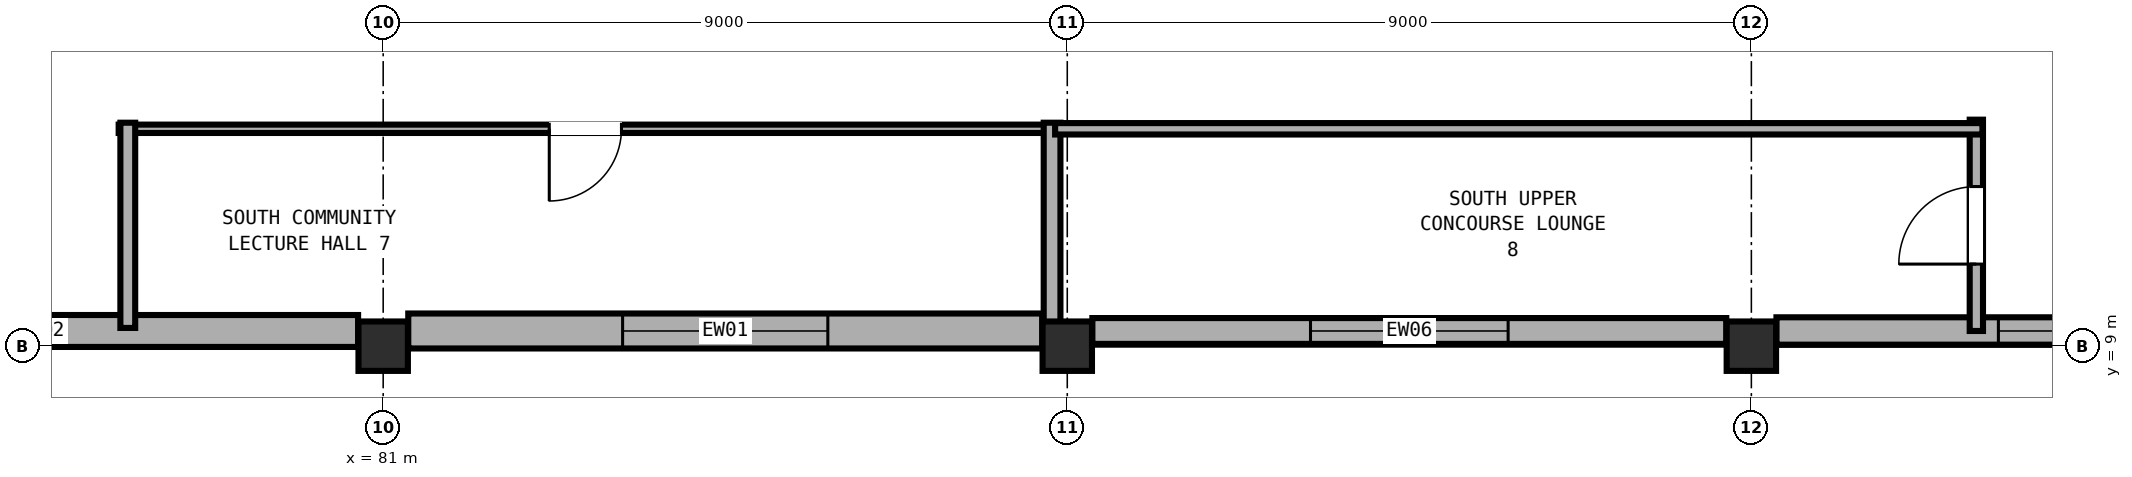
"""IFC4 building model, lengths in metres.
Left out: names, types, materials, properties, quantities, classifications, styles, units other than length and angle.
Written with IfcOpenShell. Run it as: python <this file> out.ifc"""

import sys

from ifc_helpers import new_model, si_unit, direction, frame, frame_2d, origin, origin_2d, place, context, subcontext, project, spatial, rectangle, extrude, element, fill, save


model = new_model("IFC4")
c1 = context("Model", 3, precision=1e-05, world=origin(), true_north=direction((0.0, 1.0)))
c2 = subcontext(c1, "Body", "Model", "MODEL_VIEW")
j1 = project(units=[si_unit("LENGTHUNIT", "METRE"), si_unit("PLANEANGLEUNIT", "RADIAN")], contexts=[c1])
p1 = place(None, origin())
s1 = spatial("IfcSite", under=j1, at=p1, CompositionType="ELEMENT")
p2 = place(p1, origin())
s2 = spatial("IfcBuilding", under=s1, at=p2, CompositionType="ELEMENT")
p3 = place(p2, frame((0.0, 0.0, 14.4)))
s3 = spatial("IfcBuildingStorey", under=s2, at=p3, CompositionType="ELEMENT", Elevation=14.4)
for number, where, z_axis, x_axis in (
    (1, (81.0, 9.0, 0.0), (0.0, 0.0, 1.0), (1.0, 0.0, 0.0)),
    (2, (90.0, 9.0, 0.0), (0.0, 0.0, 1.0), (1.0, 0.0, 0.0)),
    (3, (99.0, 9.0, 0.0), (0.0, 0.0, 1.0), (1.0, 0.0, 0.0)),
):
    element("IfcColumn", number, at=place(p3, frame(where, z_axis=z_axis, x_axis=x_axis)), inside=s3, PredefinedType="COLUMN", context=c2, shape_type="SweptSolid", body=[
        extrude(rectangle(XDim=0.65, YDim=0.65, at=origin_2d()), origin(), (0.0, 0.0, 1.0), 4.8),
    ])
p4 = place(p3, frame((107.67, 9.2, 0.0), z_axis=(0.0, 0.0, 1.0), x_axis=(-1.0, 0.0, 0.0)))
e4 = element("IfcWall", 4, at=p4, inside=s3, PredefinedType="SOLIDWALL", context=c2, shape_type="SweptSolid", body=[
    extrude(rectangle(XDim=8.34, YDim=0.36, at=frame_2d((4.17, 0.0))), origin(), (0.0, 0.0, 1.0), 3.58),
])
p5 = place(p4, frame((2.92, 0.0, 0.9)))
e5 = element("IfcOpeningElement", 5, at=p5, cuts=e4, PredefinedType="OPENING", context=c2, shape_type="SweptSolid", body=[
    extrude(rectangle(XDim=2.5, YDim=2.1, at=frame_2d((1.25, 1.05))), frame((0.0, 0.19, 0.0), z_axis=(0.0, -1.0, 0.0), x_axis=(1.0, 0.0, 0.0)), (0.0, 0.0, 1.0), 0.38),
])
p6 = place(p3, frame((98.67, 9.2, 0.0), z_axis=(0.0, 0.0, 1.0), x_axis=(-1.0, 0.0, 0.0)))
e6 = element("IfcWall", 6, at=p6, inside=s3, PredefinedType="SOLIDWALL", context=c2, shape_type="SweptSolid", body=[
    extrude(rectangle(XDim=8.34, YDim=0.34, at=frame_2d((4.17, 0.0))), origin(), (0.0, 0.0, 1.0), 3.58),
])
p7 = place(p6, frame((2.87, 0.0, 0.9)))
e7 = element("IfcOpeningElement", 7, at=p7, cuts=e6, PredefinedType="OPENING", context=c2, shape_type="SweptSolid", body=[
    extrude(rectangle(XDim=2.6, YDim=2.15, at=frame_2d((1.3, 1.075))), frame((0.0, 0.18, 0.0), z_axis=(0.0, -1.0, 0.0), x_axis=(1.0, 0.0, 0.0)), (0.0, 0.0, 1.0), 0.36),
])
p8 = place(p3, frame((89.67, 9.2, 0.0), z_axis=(0.0, 0.0, 1.0), x_axis=(-1.0, 0.0, 0.0)))
e8 = element("IfcWall", 8, at=p8, inside=s3, PredefinedType="SOLIDWALL", context=c2, shape_type="SweptSolid", body=[
    extrude(rectangle(XDim=8.34, YDim=0.46, at=frame_2d((4.17, 0.0))), origin(), (0.0, 0.0, 1.0), 3.58),
])
p9 = place(p8, frame((2.82, 0.0, 0.9)))
e9 = element("IfcOpeningElement", 9, at=p9, cuts=e8, PredefinedType="OPENING", context=c2, shape_type="SweptSolid", body=[
    extrude(rectangle(XDim=2.7, YDim=2.15, at=frame_2d((1.35, 1.075))), frame((0.0, 0.24, 0.0), z_axis=(0.0, -1.0, 0.0), x_axis=(1.0, 0.0, 0.0)), (0.0, 0.0, 1.0), 0.48),
])
p10 = place(p3, frame((80.67, 9.2, 0.0), z_axis=(0.0, 0.0, 1.0), x_axis=(-1.0, 0.0, 0.0)))
e10 = element("IfcWall", 10, at=p10, inside=s3, PredefinedType="SOLIDWALL", context=c2, shape_type="SweptSolid", body=[
    extrude(rectangle(XDim=8.34, YDim=0.42, at=frame_2d((4.17, 0.0))), origin(), (0.0, 0.0, 1.0), 3.58),
])
p11 = place(p10, frame((4.2, 0.0, 0.9)))
e11 = element("IfcOpeningElement", 11, at=p11, cuts=e10, PredefinedType="OPENING", context=c2, shape_type="SweptSolid", body=[
    extrude(rectangle(XDim=2.8, YDim=2.2, at=frame_2d((1.4, 1.1))), frame((0.0, 0.22, 0.0), z_axis=(0.0, -1.0, 0.0), x_axis=(1.0, 0.0, 0.0)), (0.0, 0.0, 1.0), 0.44),
])
p12 = place(p3, frame((89.8, 11.86, 0.0), z_axis=(0.0, 0.0, 1.0), x_axis=(-1.0, 0.0, 0.0)))
e12 = element("IfcWall", 12, at=p12, inside=s3, PredefinedType="PARTITIONING", context=c2, shape_type="SweptSolid", body=[
    extrude(rectangle(XDim=12.28, YDim=0.11, at=frame_2d((6.14, 0.0))), origin(), (0.0, 0.0, 1.0), 3.56),
])
p13 = place(p12, frame((5.665, 0.0, 0.0)))
e13 = element("IfcOpeningElement", 13, at=p13, cuts=e12, PredefinedType="OPENING", context=c2, shape_type="SweptSolid", body=[
    extrude(rectangle(XDim=0.95, YDim=2.18, at=frame_2d((0.475, 1.09))), frame((0.0, 0.065, 0.0), z_axis=(0.0, -1.0, 0.0), x_axis=(1.0, 0.0, 0.0)), (0.0, 0.0, 1.0), 0.13),
])
p14 = place(p3, frame((89.8, 11.94, 0.0), z_axis=(0.0, 0.0, 1.0), x_axis=(0.0, -1.0, 0.0)))
e14 = element("IfcWall", 14, at=p14, inside=s3, PredefinedType="PARTITIONING", context=c2, shape_type="SweptSolid", body=[
    extrude(rectangle(XDim=2.7, YDim=0.22, at=frame_2d((1.35, 0.0))), origin(), (0.0, 0.0, 1.0), 3.56),
])
p15 = place(p3, frame((77.64, 9.24, 0.0), z_axis=(0.0, 0.0, 1.0), x_axis=(0.0, 1.0, 0.0)))
e15 = element("IfcWall", 15, at=p15, inside=s3, PredefinedType="PARTITIONING", context=c2, shape_type="SweptSolid", body=[
    extrude(rectangle(XDim=2.7, YDim=0.195, at=frame_2d((1.35, 0.0))), origin(), (0.0, 0.0, 1.0), 3.56),
])
p16 = place(p3, frame((101.96, 9.2, 0.0), z_axis=(0.0, 0.0, 1.0), x_axis=(0.0, 1.0, 0.0)))
e16 = element("IfcWall", 16, at=p16, inside=s3, PredefinedType="PARTITIONING", context=c2, shape_type="SweptSolid", body=[
    extrude(rectangle(XDim=2.78, YDim=0.175, at=frame_2d((1.39, 0.0))), origin(), (0.0, 0.0, 1.0), 3.56),
])
p17 = place(p16, frame((0.88, 0.0, 0.0)))
e17 = element("IfcOpeningElement", 17, at=p17, cuts=e16, PredefinedType="OPENING", context=c2, shape_type="SweptSolid", body=[
    extrude(rectangle(XDim=1.02, YDim=2.16, at=frame_2d((0.51, 1.08))), frame((0.0, 0.097, 0.0), z_axis=(0.0, -1.0, 0.0), x_axis=(1.0, 0.0, 0.0)), (0.0, 0.0, 1.0), 0.195),
])
p18 = place(p3, frame((89.84, 11.86, 0.0), z_axis=(0.0, 0.0, 1.0), x_axis=(1.0, 0.0, 0.0)))
e18 = element("IfcWall", 18, at=p18, inside=s3, PredefinedType="PARTITIONING", context=c2, shape_type="SweptSolid", body=[
    extrude(rectangle(XDim=12.2, YDim=0.15, at=frame_2d((6.1, 0.0))), origin(), (0.0, 0.0, 1.0), 3.56),
])
p19 = place(p5, origin())
e19 = element("IfcWindow", 19, at=p19, inside=s3, PartitioningType="DOUBLE_PANEL_VERTICAL", PredefinedType="WINDOW", context=c2, shape_type="SweptSolid", body=[
    extrude(rectangle(XDim=2.5, YDim=2.1, at=frame_2d((1.25, 1.05))), frame((0.0, 0.03, 0.0), z_axis=(0.0, -1.0, 0.0), x_axis=(1.0, 0.0, 0.0)), (0.0, 0.0, 1.0), 0.06),
])
fill(e5, e19)
p20 = place(p7, origin())
e20 = element("IfcWindow", 20, at=p20, inside=s3, PartitioningType="DOUBLE_PANEL_VERTICAL", PredefinedType="WINDOW", context=c2, shape_type="SweptSolid", body=[
    extrude(rectangle(XDim=2.6, YDim=2.15, at=frame_2d((1.3, 1.075))), frame((0.0, 0.03, 0.0), z_axis=(0.0, -1.0, 0.0), x_axis=(1.0, 0.0, 0.0)), (0.0, 0.0, 1.0), 0.06),
])
fill(e7, e20)
p21 = place(p9, origin())
e21 = element("IfcWindow", 21, at=p21, inside=s3, PartitioningType="DOUBLE_PANEL_VERTICAL", PredefinedType="WINDOW", context=c2, shape_type="SweptSolid", body=[
    extrude(rectangle(XDim=2.7, YDim=2.15, at=frame_2d((1.35, 1.075))), frame((0.0, 0.03, 0.0), z_axis=(0.0, -1.0, 0.0), x_axis=(1.0, 0.0, 0.0)), (0.0, 0.0, 1.0), 0.06),
])
fill(e9, e21)
p22 = place(p13, origin())
e22 = element("IfcDoor", 22, at=p22, inside=s3, OperationType="SINGLE_SWING_RIGHT", PredefinedType="DOOR", context=c2, shape_type="SweptSolid", body=[
    extrude(rectangle(XDim=0.95, YDim=2.18, at=frame_2d((0.475, 1.09))), frame((0.0, 0.025, 0.0), z_axis=(0.0, -1.0, 0.0), x_axis=(1.0, 0.0, 0.0)), (0.0, 0.0, 1.0), 0.05),
])
fill(e13, e22)
p23 = place(p17, origin())
e23 = element("IfcDoor", 23, at=p23, inside=s3, OperationType="SINGLE_SWING_LEFT", PredefinedType="DOOR", context=c2, shape_type="SweptSolid", body=[
    extrude(rectangle(XDim=1.02, YDim=2.16, at=frame_2d((0.51, 1.08))), frame((0.0, 0.025, 0.0), z_axis=(0.0, -1.0, 0.0), x_axis=(1.0, 0.0, 0.0)), (0.0, 0.0, 1.0), 0.05),
])
fill(e17, e23)
save(model, sys.argv[1])
